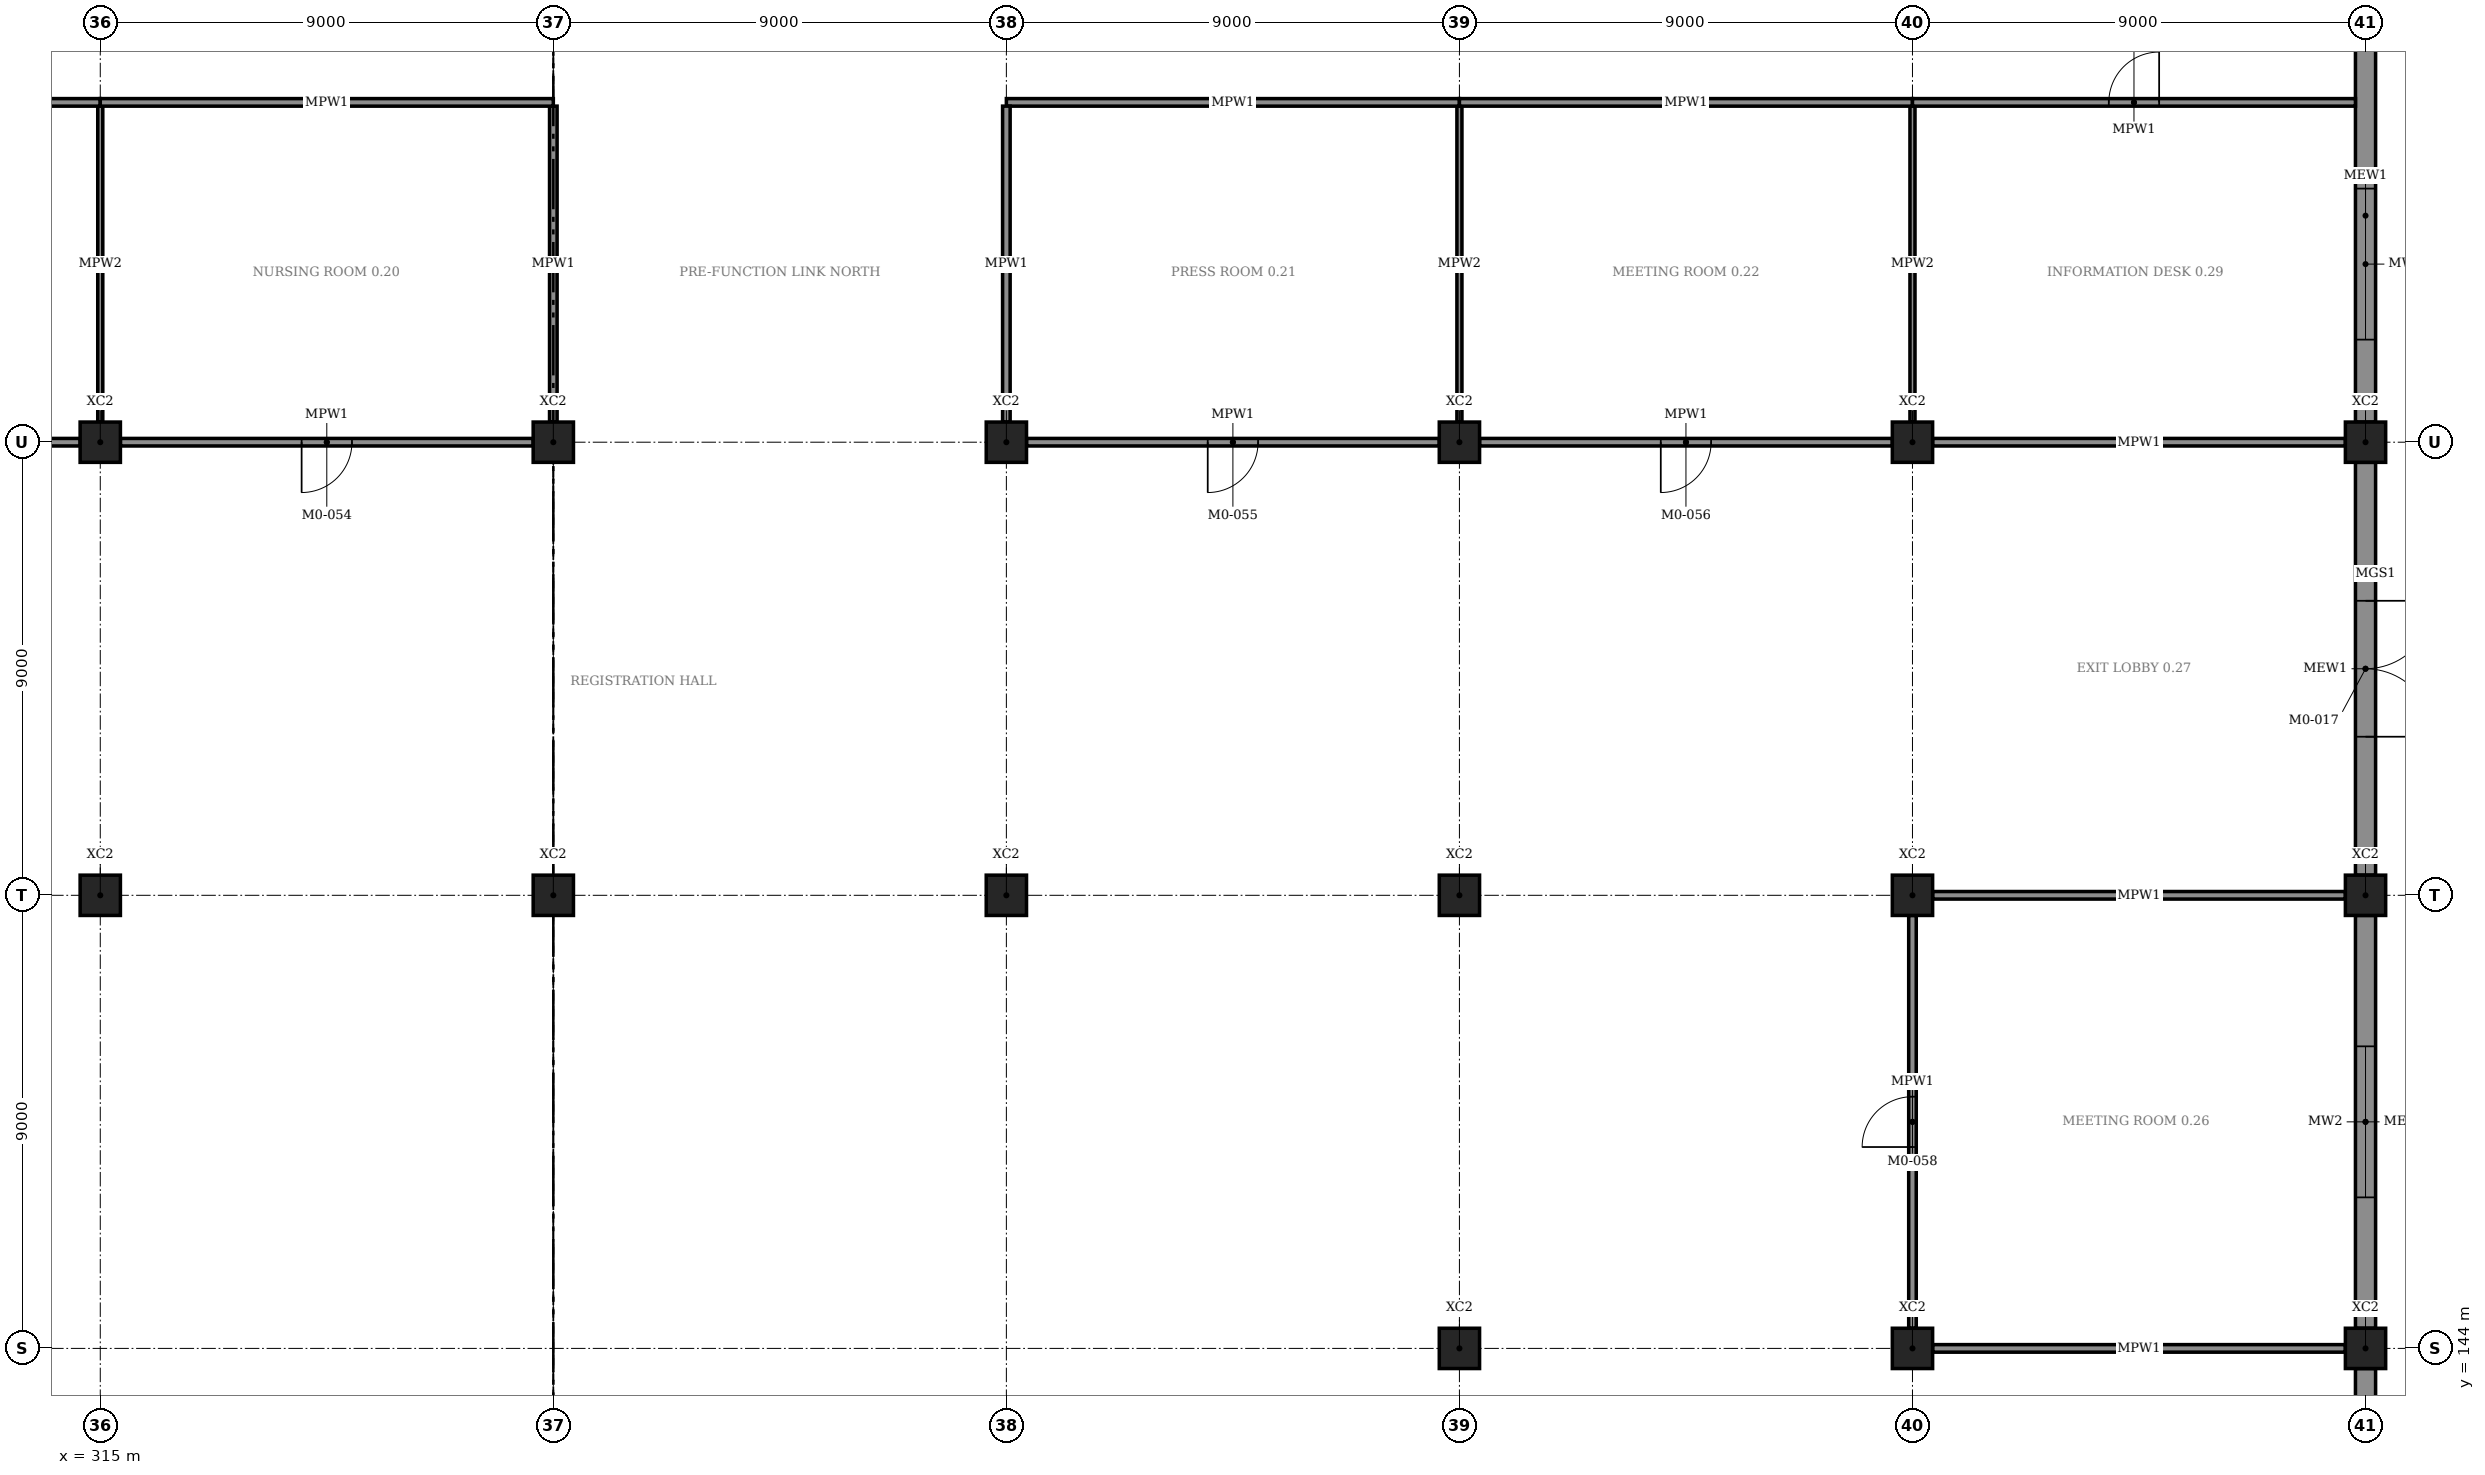
"""IFC4 building model, lengths in metres.
Left out: names, types, materials, properties, quantities, classifications, styles, units other than length and angle.
Written with IfcOpenShell. Run it as: python <this file> out.ifc"""

import sys

from ifc_helpers import new_model, si_unit, direction, frame, frame_2d, origin, origin_2d, place, context, subcontext, project, spatial, rectangle, extrude, element, fill, save


model = new_model("IFC4")
c1 = context("Model", 3, precision=1e-05, world=origin(), true_north=direction((0.0, 1.0)))
c2 = subcontext(c1, "Body", "Model", "MODEL_VIEW")
j1 = project(units=[si_unit("LENGTHUNIT", "METRE"), si_unit("PLANEANGLEUNIT", "RADIAN")], contexts=[c1])
p1 = place(None, origin())
s1 = spatial("IfcSite", under=j1, at=p1, CompositionType="ELEMENT")
p2 = place(p1, origin())
s2 = spatial("IfcBuilding", under=s1, at=p2, CompositionType="ELEMENT")
p3 = place(p2, origin())
s3 = spatial("IfcBuildingStorey", under=s2, at=p3, CompositionType="ELEMENT", Elevation=0.0)
for number, where, z_axis, x_axis in (
    (1, (315.0, 153.0, -0.3), (0.0, 0.0, 1.0), (1.0, 0.0, 0.0)),
    (2, (315.0, 162.0, -0.3), (0.0, 0.0, 1.0), (1.0, 0.0, 0.0)),
    (3, (324.0, 153.0, -0.3), (0.0, 0.0, 1.0), (1.0, 0.0, 0.0)),
    (4, (324.0, 162.0, -0.3), (0.0, 0.0, 1.0), (1.0, 0.0, 0.0)),
    (5, (333.0, 153.0, -0.3), (0.0, 0.0, 1.0), (1.0, 0.0, 0.0)),
    (6, (333.0, 162.0, -0.3), (0.0, 0.0, 1.0), (1.0, 0.0, 0.0)),
    (7, (342.0, 144.0, -0.3), (0.0, 0.0, 1.0), (1.0, 0.0, 0.0)),
    (8, (342.0, 153.0, -0.3), (0.0, 0.0, 1.0), (1.0, 0.0, 0.0)),
    (9, (342.0, 162.0, -0.3), (0.0, 0.0, 1.0), (1.0, 0.0, 0.0)),
    (10, (351.0, 144.0, -0.3), (0.0, 0.0, 1.0), (1.0, 0.0, 0.0)),
    (11, (351.0, 153.0, -0.3), (0.0, 0.0, 1.0), (1.0, 0.0, 0.0)),
    (12, (351.0, 162.0, -0.3), (0.0, 0.0, 1.0), (1.0, 0.0, 0.0)),
    (13, (360.0, 144.0, -0.3), (0.0, 0.0, 1.0), (1.0, 0.0, 0.0)),
    (14, (360.0, 153.0, -0.3), (0.0, 0.0, 1.0), (1.0, 0.0, 0.0)),
    (15, (360.0, 162.0, -0.3), (0.0, 0.0, 1.0), (1.0, 0.0, 0.0)),
):
    element("IfcColumn", number, at=place(p3, frame(where, z_axis=z_axis, x_axis=x_axis)), inside=s3, PredefinedType="COLUMN", context=c2, shape_type="SweptSolid", body=[
        extrude(rectangle(XDim=0.8, YDim=0.8, at=origin_2d()), origin(), (0.0, 0.0, 1.0), 6.3),
    ])
p4 = place(p3, frame((360.0, 135.4, 0.0), z_axis=(0.0, 0.0, 1.0), x_axis=(0.0, 1.0, 0.0)))
e16 = element("IfcWall", 16, at=p4, inside=s3, PredefinedType="STANDARD", context=c2, shape_type="SweptSolid", body=[
    extrude(rectangle(XDim=8.2, YDim=0.4, at=frame_2d((4.1, 0.0))), origin(), (0.0, 0.0, 1.0), 4.82),
])
p5 = place(p4, frame((2.75, 0.0, 0.0)))
e17 = element("IfcOpeningElement", 17, at=p5, cuts=e16, PredefinedType="OPENING", context=c2, shape_type="SweptSolid", body=[
    extrude(rectangle(XDim=2.7, YDim=2.4, at=frame_2d((1.35, 1.2))), frame((0.0, 0.21, 0.0), z_axis=(0.0, -1.0, 0.0), x_axis=(1.0, 0.0, 0.0)), (0.0, 0.0, 1.0), 0.42),
])
p6 = place(p3, frame((360.0, 144.4, 0.0), z_axis=(0.0, 0.0, 1.0), x_axis=(0.0, 1.0, 0.0)))
e18 = element("IfcWall", 18, at=p6, inside=s3, PredefinedType="STANDARD", context=c2, shape_type="SweptSolid", body=[
    extrude(rectangle(XDim=8.2, YDim=0.4, at=frame_2d((4.1, 0.0))), origin(), (0.0, 0.0, 1.0), 4.82),
])
p7 = place(p6, frame((2.6, 0.0, 0.9)))
e19 = element("IfcOpeningElement", 19, at=p7, cuts=e18, PredefinedType="OPENING", context=c2, shape_type="SweptSolid", body=[
    extrude(rectangle(XDim=3.0, YDim=2.1, at=frame_2d((1.5, 1.05))), frame((0.0, 0.21, 0.0), z_axis=(0.0, -1.0, 0.0), x_axis=(1.0, 0.0, 0.0)), (0.0, 0.0, 1.0), 0.42),
])
p8 = place(p3, frame((360.0, 153.4, 0.0), z_axis=(0.0, 0.0, 1.0), x_axis=(0.0, 1.0, 0.0)))
e20 = element("IfcWall", 20, at=p8, inside=s3, PredefinedType="STANDARD", context=c2, shape_type="SweptSolid", body=[
    extrude(rectangle(XDim=8.2, YDim=0.4, at=frame_2d((4.1, 0.0))), origin(), (0.0, 0.0, 1.0), 4.82),
])
p9 = place(p8, frame((2.75, 0.0, 0.0)))
e21 = element("IfcOpeningElement", 21, at=p9, cuts=e20, PredefinedType="OPENING", context=c2, shape_type="SweptSolid", body=[
    extrude(rectangle(XDim=2.7, YDim=2.4, at=frame_2d((1.35, 1.2))), frame((0.0, 0.21, 0.0), z_axis=(0.0, -1.0, 0.0), x_axis=(1.0, 0.0, 0.0)), (0.0, 0.0, 1.0), 0.42),
])
p10 = place(p3, frame((360.0, 162.4, 0.0), z_axis=(0.0, 0.0, 1.0), x_axis=(0.0, 1.0, 0.0)))
e22 = element("IfcWall", 22, at=p10, inside=s3, PredefinedType="STANDARD", context=c2, shape_type="SweptSolid", body=[
    extrude(rectangle(XDim=8.2, YDim=0.4, at=frame_2d((4.1, 0.0))), origin(), (0.0, 0.0, 1.0), 4.82),
])
p11 = place(p10, frame((1.638, 0.0, 0.9)))
e23 = element("IfcOpeningElement", 23, at=p11, cuts=e22, PredefinedType="OPENING", context=c2, shape_type="SweptSolid", body=[
    extrude(rectangle(XDim=3.0, YDim=2.1, at=frame_2d((1.5, 1.05))), frame((0.0, 0.21, 0.0), z_axis=(0.0, -1.0, 0.0), x_axis=(1.0, 0.0, 0.0)), (0.0, 0.0, 1.0), 0.42),
])
p12 = place(p3, frame((306.4, 162.0, 0.0), z_axis=(0.0, 0.0, 1.0), x_axis=(1.0, 0.0, 0.0)))
e24 = element("IfcWall", 24, at=p12, inside=s3, PredefinedType="PARTITIONING", context=c2, shape_type="SweptSolid", body=[
    extrude(rectangle(XDim=8.2, YDim=0.15, at=frame_2d((4.1, 0.0))), origin(), (0.0, 0.0, 1.0), 4.82),
])
p13 = place(p3, frame((297.0, 168.75, 0.0), z_axis=(0.0, 0.0, 1.0), x_axis=(1.0, 0.0, 0.0)))
e25 = element("IfcWall", 25, at=p13, inside=s3, PredefinedType="PARTITIONING", context=c2, shape_type="SweptSolid", body=[
    extrude(rectangle(XDim=18.0, YDim=0.15, at=frame_2d((9.0, 0.0))), origin(), (0.0, 0.0, 1.0), 4.82),
])
p14 = place(p3, frame((315.0, 162.4, 0.0), z_axis=(0.0, 0.0, 1.0), x_axis=(0.0, 1.0, 0.0)))
e26 = element("IfcWall", 26, at=p14, inside=s3, PredefinedType="PARTITIONING", context=c2, shape_type="SweptSolid", body=[
    extrude(rectangle(XDim=6.275, YDim=0.1, at=frame_2d((3.138, 0.0))), origin(), (0.0, 0.0, 1.0), 4.82),
])
p15 = place(p3, frame((315.4, 162.0, 0.0), z_axis=(0.0, 0.0, 1.0), x_axis=(1.0, 0.0, 0.0)))
e27 = element("IfcWall", 27, at=p15, inside=s3, PredefinedType="PARTITIONING", context=c2, shape_type="SweptSolid", body=[
    extrude(rectangle(XDim=8.2, YDim=0.15, at=frame_2d((4.1, 0.0))), origin(), (0.0, 0.0, 1.0), 4.82),
])
p16 = place(p15, frame((3.6, 0.0, 0.0)))
e28 = element("IfcOpeningElement", 28, at=p16, cuts=e27, PredefinedType="OPENING", context=c2, shape_type="SweptSolid", body=[
    extrude(rectangle(XDim=1.0, YDim=2.4, at=frame_2d((0.5, 1.2))), frame((0.0, 0.085, 0.0), z_axis=(0.0, -1.0, 0.0), x_axis=(1.0, 0.0, 0.0)), (0.0, 0.0, 1.0), 0.17),
])
p17 = place(p3, frame((315.0, 168.75, 0.0), z_axis=(0.0, 0.0, 1.0), x_axis=(1.0, 0.0, 0.0)))
e29 = element("IfcWall", 29, at=p17, inside=s3, PredefinedType="PARTITIONING", context=c2, shape_type="SweptSolid", body=[
    extrude(rectangle(XDim=9.0, YDim=0.15, at=frame_2d((4.5, 0.0))), origin(), (0.0, 0.0, 1.0), 4.82),
])
p18 = place(p3, frame((324.0, 162.4, 0.0), z_axis=(0.0, 0.0, 1.0), x_axis=(0.0, 1.0, 0.0)))
e30 = element("IfcWall", 30, at=p18, inside=s3, PredefinedType="PARTITIONING", context=c2, shape_type="SweptSolid", body=[
    extrude(rectangle(XDim=6.275, YDim=0.15, at=frame_2d((3.138, 0.0))), origin(), (0.0, 0.0, 1.0), 4.82),
])
p19 = place(p3, frame((333.4, 162.0, 0.0), z_axis=(0.0, 0.0, 1.0), x_axis=(1.0, 0.0, 0.0)))
e31 = element("IfcWall", 31, at=p19, inside=s3, PredefinedType="PARTITIONING", context=c2, shape_type="SweptSolid", body=[
    extrude(rectangle(XDim=8.2, YDim=0.15, at=frame_2d((4.1, 0.0))), origin(), (0.0, 0.0, 1.0), 4.82),
])
p20 = place(p19, frame((3.6, 0.0, 0.0)))
e32 = element("IfcOpeningElement", 32, at=p20, cuts=e31, PredefinedType="OPENING", context=c2, shape_type="SweptSolid", body=[
    extrude(rectangle(XDim=1.0, YDim=2.4, at=frame_2d((0.5, 1.2))), frame((0.0, 0.085, 0.0), z_axis=(0.0, -1.0, 0.0), x_axis=(1.0, 0.0, 0.0)), (0.0, 0.0, 1.0), 0.17),
])
p21 = place(p3, frame((333.0, 168.75, 0.0), z_axis=(0.0, 0.0, 1.0), x_axis=(1.0, 0.0, 0.0)))
e33 = element("IfcWall", 33, at=p21, inside=s3, PredefinedType="PARTITIONING", context=c2, shape_type="SweptSolid", body=[
    extrude(rectangle(XDim=9.0, YDim=0.15, at=frame_2d((4.5, 0.0))), origin(), (0.0, 0.0, 1.0), 4.82),
])
p22 = place(p3, frame((333.0, 162.4, 0.0), z_axis=(0.0, 0.0, 1.0), x_axis=(0.0, 1.0, 0.0)))
e34 = element("IfcWall", 34, at=p22, inside=s3, PredefinedType="PARTITIONING", context=c2, shape_type="SweptSolid", body=[
    extrude(rectangle(XDim=6.275, YDim=0.15, at=frame_2d((3.138, 0.0))), origin(), (0.0, 0.0, 1.0), 4.82),
])
p23 = place(p3, frame((342.0, 162.4, 0.0), z_axis=(0.0, 0.0, 1.0), x_axis=(0.0, 1.0, 0.0)))
e35 = element("IfcWall", 35, at=p23, inside=s3, PredefinedType="PARTITIONING", context=c2, shape_type="SweptSolid", body=[
    extrude(rectangle(XDim=6.275, YDim=0.1, at=frame_2d((3.138, 0.0))), origin(), (0.0, 0.0, 1.0), 4.82),
])
p24 = place(p3, frame((342.4, 162.0, 0.0), z_axis=(0.0, 0.0, 1.0), x_axis=(1.0, 0.0, 0.0)))
e36 = element("IfcWall", 36, at=p24, inside=s3, PredefinedType="PARTITIONING", context=c2, shape_type="SweptSolid", body=[
    extrude(rectangle(XDim=8.2, YDim=0.15, at=frame_2d((4.1, 0.0))), origin(), (0.0, 0.0, 1.0), 4.82),
])
p25 = place(p24, frame((3.6, 0.0, 0.0)))
e37 = element("IfcOpeningElement", 37, at=p25, cuts=e36, PredefinedType="OPENING", context=c2, shape_type="SweptSolid", body=[
    extrude(rectangle(XDim=1.0, YDim=2.4, at=frame_2d((0.5, 1.2))), frame((0.0, 0.085, 0.0), z_axis=(0.0, -1.0, 0.0), x_axis=(1.0, 0.0, 0.0)), (0.0, 0.0, 1.0), 0.17),
])
p26 = place(p3, frame((342.0, 168.75, 0.0), z_axis=(0.0, 0.0, 1.0), x_axis=(1.0, 0.0, 0.0)))
e38 = element("IfcWall", 38, at=p26, inside=s3, PredefinedType="PARTITIONING", context=c2, shape_type="SweptSolid", body=[
    extrude(rectangle(XDim=9.0, YDim=0.15, at=frame_2d((4.5, 0.0))), origin(), (0.0, 0.0, 1.0), 4.82),
])
p27 = place(p3, frame((351.0, 162.4, 0.0), z_axis=(0.0, 0.0, 1.0), x_axis=(0.0, 1.0, 0.0)))
e39 = element("IfcWall", 39, at=p27, inside=s3, PredefinedType="PARTITIONING", context=c2, shape_type="SweptSolid", body=[
    extrude(rectangle(XDim=6.275, YDim=0.1, at=frame_2d((3.138, 0.0))), origin(), (0.0, 0.0, 1.0), 4.82),
])
for number, where, z_axis, x_axis in (
    (40, (351.4, 144.0, 0.0), (0.0, 0.0, 1.0), (1.0, 0.0, 0.0)),
    (41, (351.4, 153.0, 0.0), (0.0, 0.0, 1.0), (1.0, 0.0, 0.0)),
):
    element("IfcWall", number, at=place(p3, frame(where, z_axis=z_axis, x_axis=x_axis)), inside=s3, PredefinedType="PARTITIONING", context=c2, shape_type="SweptSolid", body=[
        extrude(rectangle(XDim=8.2, YDim=0.15, at=frame_2d((4.1, 0.0))), origin(), (0.0, 0.0, 1.0), 4.82),
    ])
p28 = place(p3, frame((351.0, 144.4, 0.0), z_axis=(0.0, 0.0, 1.0), x_axis=(0.0, 1.0, 0.0)))
e42 = element("IfcWall", 42, at=p28, inside=s3, PredefinedType="PARTITIONING", context=c2, shape_type="SweptSolid", body=[
    extrude(rectangle(XDim=8.2, YDim=0.15, at=frame_2d((4.1, 0.0))), origin(), (0.0, 0.0, 1.0), 4.82),
])
p29 = place(p28, frame((3.6, 0.0, 0.0)))
e43 = element("IfcOpeningElement", 43, at=p29, cuts=e42, PredefinedType="OPENING", context=c2, shape_type="SweptSolid", body=[
    extrude(rectangle(XDim=1.0, YDim=2.4, at=frame_2d((0.5, 1.2))), frame((0.0, 0.085, 0.0), z_axis=(0.0, -1.0, 0.0), x_axis=(1.0, 0.0, 0.0)), (0.0, 0.0, 1.0), 0.17),
])
p30 = place(p3, frame((351.4, 162.0, 0.0), z_axis=(0.0, 0.0, 1.0), x_axis=(1.0, 0.0, 0.0)))
e44 = element("IfcWall", 44, at=p30, inside=s3, PredefinedType="PARTITIONING", context=c2, shape_type="SweptSolid", body=[
    extrude(rectangle(XDim=8.2, YDim=0.15, at=frame_2d((4.1, 0.0))), origin(), (0.0, 0.0, 1.0), 4.82),
])
p31 = place(p3, frame((351.0, 168.75, 0.0), z_axis=(0.0, 0.0, 1.0), x_axis=(1.0, 0.0, 0.0)))
e45 = element("IfcWall", 45, at=p31, inside=s3, PredefinedType="PARTITIONING", context=c2, shape_type="SweptSolid", body=[
    extrude(rectangle(XDim=8.8, YDim=0.15, at=frame_2d((4.4, 0.0))), origin(), (0.0, 0.0, 1.0), 4.82),
])
p32 = place(p31, frame((3.9, 0.0, 0.0)))
e46 = element("IfcOpeningElement", 46, at=p32, cuts=e45, PredefinedType="OPENING", context=c2, shape_type="SweptSolid", body=[
    extrude(rectangle(XDim=1.0, YDim=2.4, at=frame_2d((0.5, 1.2))), frame((0.0, 0.085, 0.0), z_axis=(0.0, -1.0, 0.0), x_axis=(1.0, 0.0, 0.0)), (0.0, 0.0, 1.0), 0.17),
])
p33 = place(p7, origin())
e47 = element("IfcWindow", 47, at=p33, inside=s3, PartitioningType="TRIPLE_PANEL_VERTICAL", PredefinedType="WINDOW", context=c2, shape_type="SweptSolid", body=[
    extrude(rectangle(XDim=3.0, YDim=2.1, at=frame_2d((1.5, 1.05))), frame((0.0, 0.03, 0.0), z_axis=(0.0, -1.0, 0.0), x_axis=(1.0, 0.0, 0.0)), (0.0, 0.0, 1.0), 0.06),
])
fill(e19, e47)
p34 = place(p9, frame((2.7, 0.0, 0.0), z_axis=(0.0, 0.0, 1.0), x_axis=(-1.0, 0.0, 0.0)))
e48 = element("IfcDoor", 48, at=p34, inside=s3, OperationType="DOUBLE_DOOR_SINGLE_SWING", PredefinedType="DOOR", context=c2, shape_type="SweptSolid", body=[
    extrude(rectangle(XDim=2.7, YDim=2.4, at=frame_2d((1.35, 1.2))), frame((0.0, 0.025, 0.0), z_axis=(0.0, -1.0, 0.0), x_axis=(1.0, 0.0, 0.0)), (0.0, 0.0, 1.0), 0.05),
])
fill(e21, e48)
p35 = place(p11, origin())
e49 = element("IfcWindow", 49, at=p35, inside=s3, PartitioningType="TRIPLE_PANEL_VERTICAL", PredefinedType="WINDOW", context=c2, shape_type="SweptSolid", body=[
    extrude(rectangle(XDim=3.0, YDim=2.1, at=frame_2d((1.5, 1.05))), frame((0.0, 0.03, 0.0), z_axis=(0.0, -1.0, 0.0), x_axis=(1.0, 0.0, 0.0)), (0.0, 0.0, 1.0), 0.06),
])
fill(e23, e49)
p36 = place(p16, frame((1.0, 0.0, 0.0), z_axis=(0.0, 0.0, 1.0), x_axis=(-1.0, 0.0, 0.0)))
e50 = element("IfcDoor", 50, at=p36, inside=s3, OperationType="SINGLE_SWING_LEFT", PredefinedType="DOOR", context=c2, shape_type="SweptSolid", body=[
    extrude(rectangle(XDim=1.0, YDim=2.4, at=frame_2d((0.5, 1.2))), frame((0.0, 0.025, 0.0), z_axis=(0.0, -1.0, 0.0), x_axis=(1.0, 0.0, 0.0)), (0.0, 0.0, 1.0), 0.05),
])
fill(e28, e50)
p37 = place(p20, frame((1.0, 0.0, 0.0), z_axis=(0.0, 0.0, 1.0), x_axis=(-1.0, 0.0, 0.0)))
e51 = element("IfcDoor", 51, at=p37, inside=s3, OperationType="SINGLE_SWING_LEFT", PredefinedType="DOOR", context=c2, shape_type="SweptSolid", body=[
    extrude(rectangle(XDim=1.0, YDim=2.4, at=frame_2d((0.5, 1.2))), frame((0.0, 0.025, 0.0), z_axis=(0.0, -1.0, 0.0), x_axis=(1.0, 0.0, 0.0)), (0.0, 0.0, 1.0), 0.05),
])
fill(e32, e51)
p38 = place(p25, frame((1.0, 0.0, 0.0), z_axis=(0.0, 0.0, 1.0), x_axis=(-1.0, 0.0, 0.0)))
e52 = element("IfcDoor", 52, at=p38, inside=s3, OperationType="SINGLE_SWING_LEFT", PredefinedType="DOOR", context=c2, shape_type="SweptSolid", body=[
    extrude(rectangle(XDim=1.0, YDim=2.4, at=frame_2d((0.5, 1.2))), frame((0.0, 0.025, 0.0), z_axis=(0.0, -1.0, 0.0), x_axis=(1.0, 0.0, 0.0)), (0.0, 0.0, 1.0), 0.05),
])
fill(e37, e52)
p39 = place(p29, origin())
e53 = element("IfcDoor", 53, at=p39, inside=s3, OperationType="SINGLE_SWING_LEFT", PredefinedType="DOOR", context=c2, shape_type="SweptSolid", body=[
    extrude(rectangle(XDim=1.0, YDim=2.4, at=frame_2d((0.5, 1.2))), frame((0.0, 0.025, 0.0), z_axis=(0.0, -1.0, 0.0), x_axis=(1.0, 0.0, 0.0)), (0.0, 0.0, 1.0), 0.05),
])
fill(e43, e53)
p40 = place(p32, origin())
e54 = element("IfcDoor", 54, at=p40, inside=s3, OperationType="SINGLE_SWING_RIGHT", PredefinedType="DOOR", context=c2, shape_type="SweptSolid", body=[
    extrude(rectangle(XDim=1.0, YDim=2.4, at=frame_2d((0.5, 1.2))), frame((0.0, 0.025, 0.0), z_axis=(0.0, -1.0, 0.0), x_axis=(1.0, 0.0, 0.0)), (0.0, 0.0, 1.0), 0.05),
])
fill(e46, e54)
save(model, sys.argv[1])
